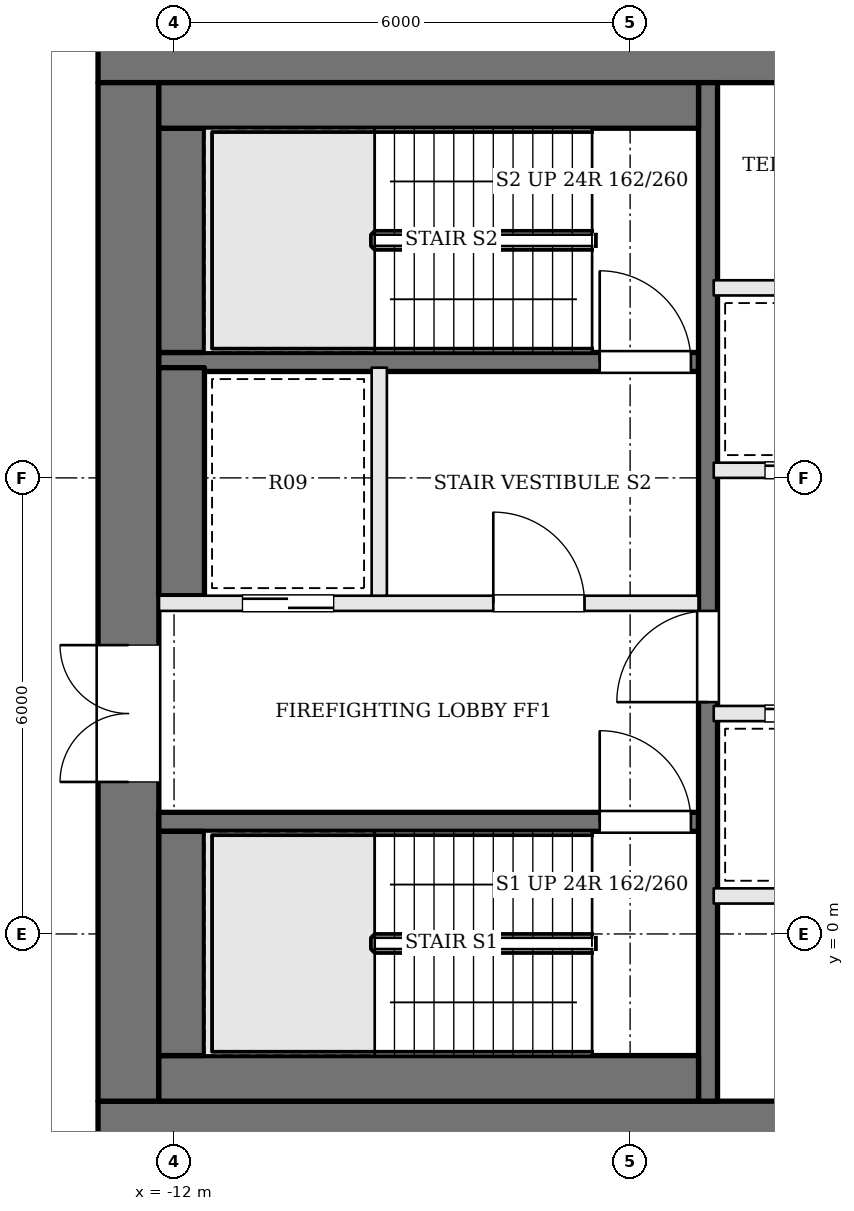
"""IFC4 building model, lengths in metres.
Left out: names, types, materials, properties, quantities, classifications, styles, units other than length and angle.
Written with IfcOpenShell. Run it as: python <this file> out.ifc"""

import sys

from ifc_helpers import new_model, si_unit, direction, frame, frame_2d, origin, place, context, subcontext, project, spatial, rectangle, extrude, element, fill, save


model = new_model("IFC4")
c1 = context("Model", 3, precision=1e-05, world=origin(), true_north=direction((0.0, 1.0)))
c2 = subcontext(c1, "Body", "Model", "MODEL_VIEW")
j1 = project(units=[si_unit("LENGTHUNIT", "METRE"), si_unit("PLANEANGLEUNIT", "RADIAN")], contexts=[c1])
p1 = place(None, origin())
s1 = spatial("IfcSite", under=j1, at=p1, CompositionType="ELEMENT")
p2 = place(p1, origin())
s2 = spatial("IfcBuilding", under=s1, at=p2, CompositionType="ELEMENT")
p3 = place(p2, frame((0.0, 0.0, 225.3)))
s3 = spatial("IfcBuildingStorey", under=s2, at=p3, CompositionType="ELEMENT", Elevation=225.3)
p4 = place(p3, frame((-13.0, 11.6, 0.0), z_axis=(0.0, 0.0, 1.0), x_axis=(1.0, 0.0, 0.0)))
e1 = element("IfcWall", 1, at=p4, inside=s3, PredefinedType="SHEAR", context=c2, shape_type="SweptSolid", body=[
    extrude(rectangle(XDim=26.0, YDim=0.8, at=frame_2d((13.0, 0.0))), origin(), (0.0, 0.0, 1.0), 3.9),
])
p5 = place(p4, frame((9.375, 0.0, 0.0)))
e2 = element("IfcOpeningElement", 2, at=p5, cuts=e1, PredefinedType="OPENING", context=c2, shape_type="SweptSolid", body=[
    extrude(rectangle(XDim=0.7, YDim=2.1, at=frame_2d((0.35, 1.05))), frame((0.0, 0.41, 0.0), z_axis=(0.0, -1.0, 0.0), x_axis=(1.0, 0.0, 0.0)), (0.0, 0.0, 1.0), 0.82),
])
p6 = place(p4, frame((12.075, 0.0, 0.0)))
e3 = element("IfcOpeningElement", 3, at=p6, cuts=e1, PredefinedType="OPENING", context=c2, shape_type="SweptSolid", body=[
    extrude(rectangle(XDim=1.0, YDim=2.1, at=frame_2d((0.5, 1.05))), frame((0.0, 0.41, 0.0), z_axis=(0.0, -1.0, 0.0), x_axis=(1.0, 0.0, 0.0)), (0.0, 0.0, 1.0), 0.82),
])
p7 = place(p4, frame((14.675, 0.0, 0.0)))
e4 = element("IfcOpeningElement", 4, at=p7, cuts=e1, PredefinedType="OPENING", context=c2, shape_type="SweptSolid", body=[
    extrude(rectangle(XDim=0.7, YDim=2.1, at=frame_2d((0.35, 1.05))), frame((0.0, 0.41, 0.0), z_axis=(0.0, -1.0, 0.0), x_axis=(1.0, 0.0, 0.0)), (0.0, 0.0, 1.0), 0.82),
])
p8 = place(p4, frame((16.625, 0.0, 0.0)))
e5 = element("IfcOpeningElement", 5, at=p8, cuts=e1, PredefinedType="OPENING", context=c2, shape_type="SweptSolid", body=[
    extrude(rectangle(XDim=0.9, YDim=2.1, at=frame_2d((0.45, 1.05))), frame((0.0, 0.41, 0.0), z_axis=(0.0, -1.0, 0.0), x_axis=(1.0, 0.0, 0.0)), (0.0, 0.0, 1.0), 0.82),
])
p9 = place(p3, frame((-13.0, -2.6, 0.0), z_axis=(0.0, 0.0, 1.0), x_axis=(1.0, 0.0, 0.0)))
e6 = element("IfcWall", 6, at=p9, inside=s3, PredefinedType="SHEAR", context=c2, shape_type="SweptSolid", body=[
    extrude(rectangle(XDim=26.0, YDim=0.8, at=frame_2d((13.0, 0.0))), origin(), (0.0, 0.0, 1.0), 3.9),
])
p10 = place(p9, frame((9.2, 0.0, 0.0)))
e7 = element("IfcOpeningElement", 7, at=p10, cuts=e6, PredefinedType="OPENING", context=c2, shape_type="SweptSolid", body=[
    extrude(rectangle(XDim=0.9, YDim=2.1, at=frame_2d((0.45, 1.05))), frame((0.0, 0.41, 0.0), z_axis=(0.0, -1.0, 0.0), x_axis=(1.0, 0.0, 0.0)), (0.0, 0.0, 1.0), 0.82),
])
p11 = place(p9, frame((12.3, 0.0, 0.0)))
e8 = element("IfcOpeningElement", 8, at=p11, cuts=e6, PredefinedType="OPENING", context=c2, shape_type="SweptSolid", body=[
    extrude(rectangle(XDim=0.9, YDim=2.1, at=frame_2d((0.45, 1.05))), frame((0.0, 0.41, 0.0), z_axis=(0.0, -1.0, 0.0), x_axis=(1.0, 0.0, 0.0)), (0.0, 0.0, 1.0), 0.82),
])
p12 = place(p9, frame((14.7, 0.0, 0.0)))
e9 = element("IfcOpeningElement", 9, at=p12, cuts=e6, PredefinedType="OPENING", context=c2, shape_type="SweptSolid", body=[
    extrude(rectangle(XDim=1.0, YDim=2.1, at=frame_2d((0.5, 1.05))), frame((0.0, 0.41, 0.0), z_axis=(0.0, -1.0, 0.0), x_axis=(1.0, 0.0, 0.0)), (0.0, 0.0, 1.0), 0.82),
])
p13 = place(p9, frame((16.55, 0.0, 0.0)))
e10 = element("IfcOpeningElement", 10, at=p13, cuts=e6, PredefinedType="OPENING", context=c2, shape_type="SweptSolid", body=[
    extrude(rectangle(XDim=0.9, YDim=2.1, at=frame_2d((0.45, 1.05))), frame((0.0, 0.41, 0.0), z_axis=(0.0, -1.0, 0.0), x_axis=(1.0, 0.0, 0.0)), (0.0, 0.0, 1.0), 0.82),
])
p14 = place(p3, frame((-12.6, -2.2, 0.0), z_axis=(0.0, 0.0, 1.0), x_axis=(0.0, 1.0, 0.0)))
e11 = element("IfcWall", 11, at=p14, inside=s3, PredefinedType="SHEAR", context=c2, shape_type="SweptSolid", body=[
    extrude(rectangle(XDim=13.4, YDim=0.8, at=frame_2d((6.7, 0.0))), origin(), (0.0, 0.0, 1.0), 3.9),
])
p15 = place(p14, frame((4.2, 0.0, 0.0)))
e12 = element("IfcOpeningElement", 12, at=p15, cuts=e11, PredefinedType="OPENING", context=c2, shape_type="SweptSolid", body=[
    extrude(rectangle(XDim=1.8, YDim=2.1, at=frame_2d((0.9, 1.05))), frame((0.0, 0.41, 0.0), z_axis=(0.0, -1.0, 0.0), x_axis=(1.0, 0.0, 0.0)), (0.0, 0.0, 1.0), 0.82),
])
p16 = place(p3, frame((-12.2, 1.475, 0.0), z_axis=(0.0, 0.0, 1.0), x_axis=(1.0, 0.0, 0.0)))
e13 = element("IfcWall", 13, at=p16, inside=s3, PredefinedType="SOLIDWALL", context=c2, shape_type="SweptSolid", body=[
    extrude(rectangle(XDim=7.1, YDim=0.25, at=frame_2d((3.55, 0.0))), origin(), (0.0, 0.0, 1.0), 3.7),
])
p17 = place(p16, frame((5.8, 0.0, 0.0)))
e14 = element("IfcOpeningElement", 14, at=p17, cuts=e13, PredefinedType="OPENING", context=c2, shape_type="SweptSolid", body=[
    extrude(rectangle(XDim=1.2, YDim=2.1, at=frame_2d((0.6, 1.05))), frame((0.0, 0.135, 0.0), z_axis=(0.0, -1.0, 0.0), x_axis=(1.0, 0.0, 0.0)), (0.0, 0.0, 1.0), 0.27),
])
p18 = place(p3, frame((-12.2, 4.35, 0.0), z_axis=(0.0, 0.0, 1.0), x_axis=(1.0, 0.0, 0.0)))
e15 = element("IfcWall", 15, at=p18, inside=s3, PredefinedType="SOLIDWALL", context=c2, shape_type="SweptSolid", body=[
    extrude(rectangle(XDim=7.1, YDim=0.2, at=frame_2d((3.55, 0.0))), origin(), (0.0, 0.0, 1.0), 3.7),
])
p19 = place(p18, frame((4.4, 0.0, 0.0)))
e16 = element("IfcOpeningElement", 16, at=p19, cuts=e15, PredefinedType="OPENING", context=c2, shape_type="SweptSolid", body=[
    extrude(rectangle(XDim=1.2, YDim=2.1, at=frame_2d((0.6, 1.05))), frame((0.0, 0.11, 0.0), z_axis=(0.0, -1.0, 0.0), x_axis=(1.0, 0.0, 0.0)), (0.0, 0.0, 1.0), 0.22),
])
p20 = place(p18, frame((1.1, 0.0, 0.0)))
e17 = element("IfcOpeningElement", 17, at=p20, cuts=e15, PredefinedType="OPENING", context=c2, shape_type="SweptSolid", body=[
    extrude(rectangle(XDim=1.2, YDim=2.1, at=frame_2d((0.6, 1.05))), frame((0.0, 0.11, 0.0), z_axis=(0.0, -1.0, 0.0), x_axis=(1.0, 0.0, 0.0)), (0.0, 0.0, 1.0), 0.22),
])
p21 = place(p3, frame((-12.2, 7.525, 0.0), z_axis=(0.0, 0.0, 1.0), x_axis=(1.0, 0.0, 0.0)))
e18 = element("IfcWall", 18, at=p21, inside=s3, PredefinedType="SOLIDWALL", context=c2, shape_type="SweptSolid", body=[
    extrude(rectangle(XDim=7.1, YDim=0.25, at=frame_2d((3.55, 0.0))), origin(), (0.0, 0.0, 1.0), 3.7),
])
p22 = place(p21, frame((5.8, 0.0, 0.0)))
e19 = element("IfcOpeningElement", 19, at=p22, cuts=e18, PredefinedType="OPENING", context=c2, shape_type="SweptSolid", body=[
    extrude(rectangle(XDim=1.2, YDim=2.1, at=frame_2d((0.6, 1.05))), frame((0.0, 0.135, 0.0), z_axis=(0.0, -1.0, 0.0), x_axis=(1.0, 0.0, 0.0)), (0.0, 0.0, 1.0), 0.27),
])
p23 = place(p3, frame((-9.3, 4.45, 0.0), z_axis=(0.0, 0.0, 1.0), x_axis=(0.0, 1.0, 0.0)))
e20 = element("IfcWall", 20, at=p23, inside=s3, PredefinedType="SOLIDWALL", context=c2, shape_type="SweptSolid", body=[
    extrude(rectangle(XDim=3.0, YDim=0.2, at=frame_2d((1.5, 0.0))), origin(), (0.0, 0.0, 1.0), 3.7),
])
p24 = place(p3, frame((-4.975, -2.2, 0.0), z_axis=(0.0, 0.0, 1.0), x_axis=(0.0, 1.0, 0.0)))
e21 = element("IfcWall", 21, at=p24, inside=s3, PredefinedType="SOLIDWALL", context=c2, shape_type="SweptSolid", body=[
    extrude(rectangle(XDim=13.4, YDim=0.25, at=frame_2d((6.7, 0.0))), origin(), (0.0, 0.0, 1.0), 3.7),
])
p25 = place(p24, frame((5.25, 0.0, 0.0)))
e22 = element("IfcOpeningElement", 22, at=p25, cuts=e21, PredefinedType="OPENING", context=c2, shape_type="SweptSolid", body=[
    extrude(rectangle(XDim=1.2, YDim=2.1, at=frame_2d((0.6, 1.05))), frame((0.0, 0.135, 0.0), z_axis=(0.0, -1.0, 0.0), x_axis=(1.0, 0.0, 0.0)), (0.0, 0.0, 1.0), 0.27),
])
p26 = place(p3, frame((-12.2, -1.9, 0.0), z_axis=(0.0, 0.0, 1.0), x_axis=(1.0, 0.0, 0.0)))
e23 = element("IfcWall", 23, at=p26, inside=s3, PredefinedType="SOLIDWALL", context=c2, shape_type="SweptSolid", body=[
    extrude(rectangle(XDim=7.1, YDim=0.6, at=frame_2d((3.55, 0.0))), origin(), (0.0, 0.0, 1.0), 3.7),
])
p27 = place(p3, frame((-11.9, -1.6, 0.0), z_axis=(0.0, 0.0, 1.0), x_axis=(0.0, 1.0, 0.0)))
e24 = element("IfcWall", 24, at=p27, inside=s3, PredefinedType="SOLIDWALL", context=c2, shape_type="SweptSolid", body=[
    extrude(rectangle(XDim=2.95, YDim=0.6, at=frame_2d((1.475, 0.0))), origin(), (0.0, 0.0, 1.0), 3.7),
])
p28 = place(p3, frame((-11.9, 4.45, 0.0), z_axis=(0.0, 0.0, 1.0), x_axis=(0.0, 1.0, 0.0)))
e25 = element("IfcWall", 25, at=p28, inside=s3, PredefinedType="SOLIDWALL", context=c2, shape_type="SweptSolid", body=[
    extrude(rectangle(XDim=3.0, YDim=0.6, at=frame_2d((1.5, 0.0))), origin(), (0.0, 0.0, 1.0), 3.7),
])
p29 = place(p3, frame((-11.9, 7.65, 0.0), z_axis=(0.0, 0.0, 1.0), x_axis=(0.0, 1.0, 0.0)))
e26 = element("IfcWall", 26, at=p29, inside=s3, PredefinedType="SOLIDWALL", context=c2, shape_type="SweptSolid", body=[
    extrude(rectangle(XDim=2.95, YDim=0.6, at=frame_2d((1.475, 0.0))), origin(), (0.0, 0.0, 1.0), 3.7),
])
p30 = place(p3, frame((-12.2, 10.9, 0.0), z_axis=(0.0, 0.0, 1.0), x_axis=(1.0, 0.0, 0.0)))
e27 = element("IfcWall", 27, at=p30, inside=s3, PredefinedType="SOLIDWALL", context=c2, shape_type="SweptSolid", body=[
    extrude(rectangle(XDim=7.1, YDim=0.6, at=frame_2d((3.55, 0.0))), origin(), (0.0, 0.0, 1.0), 3.7),
])
p31 = place(p3, frame((-4.9, 0.5, 0.0), z_axis=(0.0, 0.0, 1.0), x_axis=(1.0, 0.0, 0.0)))
e28 = element("IfcWall", 28, at=p31, inside=s3, PredefinedType="SOLIDWALL", context=c2, shape_type="SweptSolid", body=[
    extrude(rectangle(XDim=9.8, YDim=0.2, at=frame_2d((4.9, 0.0))), origin(), (0.0, 0.0, 1.0), 3.7),
])
p32 = place(p3, frame((-4.9, 2.9, 0.0), z_axis=(0.0, 0.0, 1.0), x_axis=(1.0, 0.0, 0.0)))
e29 = element("IfcWall", 29, at=p32, inside=s3, PredefinedType="SOLIDWALL", context=c2, shape_type="SweptSolid", body=[
    extrude(rectangle(XDim=9.8, YDim=0.2, at=frame_2d((4.9, 0.0))), origin(), (0.0, 0.0, 1.0), 3.7),
])
p33 = place(p32, frame((0.675, 0.0, 0.0)))
e30 = element("IfcOpeningElement", 30, at=p33, cuts=e29, PredefinedType="OPENING", context=c2, shape_type="SweptSolid", body=[
    extrude(rectangle(XDim=1.1, YDim=2.1, at=frame_2d((0.55, 1.05))), frame((0.0, 0.11, 0.0), z_axis=(0.0, -1.0, 0.0), x_axis=(1.0, 0.0, 0.0)), (0.0, 0.0, 1.0), 0.22),
])
p34 = place(p32, frame((2.613, 0.0, 0.0)))
e31 = element("IfcOpeningElement", 31, at=p34, cuts=e29, PredefinedType="OPENING", context=c2, shape_type="SweptSolid", body=[
    extrude(rectangle(XDim=0.9, YDim=2.1, at=frame_2d((0.45, 1.05))), frame((0.0, 0.11, 0.0), z_axis=(0.0, -1.0, 0.0), x_axis=(1.0, 0.0, 0.0)), (0.0, 0.0, 1.0), 0.22),
])
p35 = place(p32, frame((4.35, 0.0, 0.0)))
e32 = element("IfcOpeningElement", 32, at=p35, cuts=e29, PredefinedType="OPENING", context=c2, shape_type="SweptSolid", body=[
    extrude(rectangle(XDim=1.1, YDim=2.1, at=frame_2d((0.55, 1.05))), frame((0.0, 0.11, 0.0), z_axis=(0.0, -1.0, 0.0), x_axis=(1.0, 0.0, 0.0)), (0.0, 0.0, 1.0), 0.22),
])
p36 = place(p32, frame((7.463, 0.0, 0.0)))
e33 = element("IfcOpeningElement", 33, at=p36, cuts=e29, PredefinedType="OPENING", context=c2, shape_type="SweptSolid", body=[
    extrude(rectangle(XDim=1.0, YDim=2.1, at=frame_2d((0.5, 1.05))), frame((0.0, 0.11, 0.0), z_axis=(0.0, -1.0, 0.0), x_axis=(1.0, 0.0, 0.0)), (0.0, 0.0, 1.0), 0.22),
])
p37 = place(p3, frame((-4.9, 6.1, 0.0), z_axis=(0.0, 0.0, 1.0), x_axis=(1.0, 0.0, 0.0)))
e34 = element("IfcWall", 34, at=p37, inside=s3, PredefinedType="SOLIDWALL", context=c2, shape_type="SweptSolid", body=[
    extrude(rectangle(XDim=9.8, YDim=0.2, at=frame_2d((4.9, 0.0))), origin(), (0.0, 0.0, 1.0), 3.7),
])
p38 = place(p37, frame((0.675, 0.0, 0.0)))
e35 = element("IfcOpeningElement", 35, at=p38, cuts=e34, PredefinedType="OPENING", context=c2, shape_type="SweptSolid", body=[
    extrude(rectangle(XDim=1.1, YDim=2.1, at=frame_2d((0.55, 1.05))), frame((0.0, 0.11, 0.0), z_axis=(0.0, -1.0, 0.0), x_axis=(1.0, 0.0, 0.0)), (0.0, 0.0, 1.0), 0.22),
])
p39 = place(p37, frame((3.125, 0.0, 0.0)))
e36 = element("IfcOpeningElement", 36, at=p39, cuts=e34, PredefinedType="OPENING", context=c2, shape_type="SweptSolid", body=[
    extrude(rectangle(XDim=1.1, YDim=2.1, at=frame_2d((0.55, 1.05))), frame((0.0, 0.11, 0.0), z_axis=(0.0, -1.0, 0.0), x_axis=(1.0, 0.0, 0.0)), (0.0, 0.0, 1.0), 0.22),
])
p40 = place(p37, frame((5.575, 0.0, 0.0)))
e37 = element("IfcOpeningElement", 37, at=p40, cuts=e34, PredefinedType="OPENING", context=c2, shape_type="SweptSolid", body=[
    extrude(rectangle(XDim=1.1, YDim=2.1, at=frame_2d((0.55, 1.05))), frame((0.0, 0.11, 0.0), z_axis=(0.0, -1.0, 0.0), x_axis=(1.0, 0.0, 0.0)), (0.0, 0.0, 1.0), 0.22),
])
p41 = place(p37, frame((8.025, 0.0, 0.0)))
e38 = element("IfcOpeningElement", 38, at=p41, cuts=e34, PredefinedType="OPENING", context=c2, shape_type="SweptSolid", body=[
    extrude(rectangle(XDim=1.1, YDim=2.1, at=frame_2d((0.55, 1.05))), frame((0.0, 0.11, 0.0), z_axis=(0.0, -1.0, 0.0), x_axis=(1.0, 0.0, 0.0)), (0.0, 0.0, 1.0), 0.22),
])
p42 = place(p3, frame((-4.9, 8.5, 0.0), z_axis=(0.0, 0.0, 1.0), x_axis=(1.0, 0.0, 0.0)))
e39 = element("IfcWall", 39, at=p42, inside=s3, PredefinedType="SOLIDWALL", context=c2, shape_type="SweptSolid", body=[
    extrude(rectangle(XDim=9.8, YDim=0.2, at=frame_2d((4.9, 0.0))), origin(), (0.0, 0.0, 1.0), 3.7),
])
p43 = place(p15, origin())
e40 = element("IfcDoor", 40, at=p43, inside=s3, OperationType="DOUBLE_DOOR_SINGLE_SWING", PredefinedType="DOOR", context=c2, shape_type="SweptSolid", body=[
    extrude(rectangle(XDim=1.8, YDim=2.1, at=frame_2d((0.9, 1.05))), frame((0.0, 0.025, 0.0), z_axis=(0.0, -1.0, 0.0), x_axis=(1.0, 0.0, 0.0)), (0.0, 0.0, 1.0), 0.05),
])
fill(e12, e40)
p44 = place(p25, origin())
e41 = element("IfcDoor", 41, at=p44, inside=s3, OperationType="SINGLE_SWING_LEFT", PredefinedType="DOOR", context=c2, shape_type="SweptSolid", body=[
    extrude(rectangle(XDim=1.2, YDim=2.1, at=frame_2d((0.6, 1.05))), frame((0.0, 0.025, 0.0), z_axis=(0.0, -1.0, 0.0), x_axis=(1.0, 0.0, 0.0)), (0.0, 0.0, 1.0), 0.05),
])
fill(e22, e41)
p45 = place(p19, origin())
e42 = element("IfcDoor", 42, at=p45, inside=s3, OperationType="SINGLE_SWING_LEFT", PredefinedType="DOOR", context=c2, shape_type="SweptSolid", body=[
    extrude(rectangle(XDim=1.2, YDim=2.1, at=frame_2d((0.6, 1.05))), frame((0.0, 0.025, 0.0), z_axis=(0.0, -1.0, 0.0), x_axis=(1.0, 0.0, 0.0)), (0.0, 0.0, 1.0), 0.05),
])
fill(e16, e42)
p46 = place(p17, origin())
e43 = element("IfcDoor", 43, at=p46, inside=s3, OperationType="SINGLE_SWING_LEFT", PredefinedType="DOOR", context=c2, shape_type="SweptSolid", body=[
    extrude(rectangle(XDim=1.2, YDim=2.1, at=frame_2d((0.6, 1.05))), frame((0.0, 0.025, 0.0), z_axis=(0.0, -1.0, 0.0), x_axis=(1.0, 0.0, 0.0)), (0.0, 0.0, 1.0), 0.05),
])
fill(e14, e43)
p47 = place(p22, origin())
e44 = element("IfcDoor", 44, at=p47, inside=s3, OperationType="SINGLE_SWING_LEFT", PredefinedType="DOOR", context=c2, shape_type="SweptSolid", body=[
    extrude(rectangle(XDim=1.2, YDim=2.1, at=frame_2d((0.6, 1.05))), frame((0.0, 0.025, 0.0), z_axis=(0.0, -1.0, 0.0), x_axis=(1.0, 0.0, 0.0)), (0.0, 0.0, 1.0), 0.05),
])
fill(e19, e44)
p48 = place(p20, origin())
e45 = element("IfcDoor", 45, at=p48, inside=s3, OperationType="SLIDING_TO_RIGHT", PredefinedType="DOOR", context=c2, shape_type="SweptSolid", body=[
    extrude(rectangle(XDim=1.2, YDim=2.1, at=frame_2d((0.6, 1.05))), frame((0.0, 0.025, 0.0), z_axis=(0.0, -1.0, 0.0), x_axis=(1.0, 0.0, 0.0)), (0.0, 0.0, 1.0), 0.05),
])
fill(e17, e45)
p49 = place(p33, origin())
e46 = element("IfcDoor", 46, at=p49, inside=s3, OperationType="SLIDING_TO_RIGHT", PredefinedType="DOOR", context=c2, shape_type="SweptSolid", body=[
    extrude(rectangle(XDim=1.1, YDim=2.1, at=frame_2d((0.55, 1.05))), frame((0.0, 0.025, 0.0), z_axis=(0.0, -1.0, 0.0), x_axis=(1.0, 0.0, 0.0)), (0.0, 0.0, 1.0), 0.05),
])
fill(e30, e46)
p50 = place(p38, origin())
e47 = element("IfcDoor", 47, at=p50, inside=s3, OperationType="SLIDING_TO_RIGHT", PredefinedType="DOOR", context=c2, shape_type="SweptSolid", body=[
    extrude(rectangle(XDim=1.1, YDim=2.1, at=frame_2d((0.55, 1.05))), frame((0.0, 0.025, 0.0), z_axis=(0.0, -1.0, 0.0), x_axis=(1.0, 0.0, 0.0)), (0.0, 0.0, 1.0), 0.05),
])
fill(e35, e47)
save(model, sys.argv[1])
